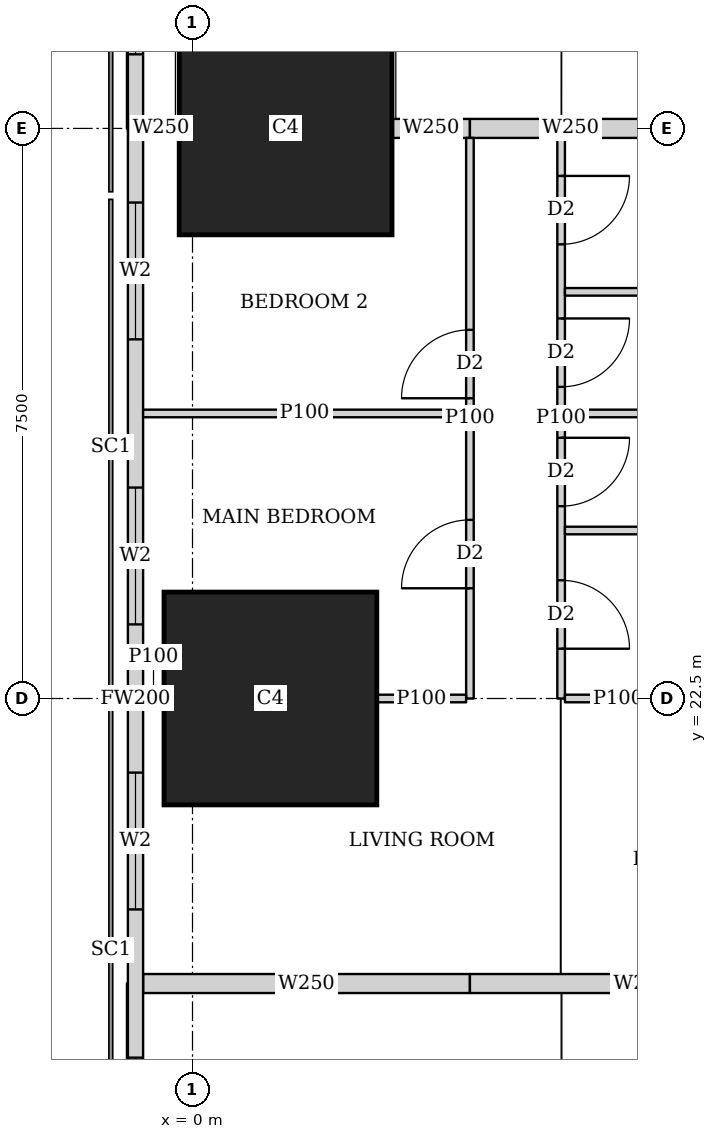
"""IFC4 building model, lengths in metres.
Left out: names, types, materials, properties, quantities, classifications, styles, units other than length and angle.
Written with IfcOpenShell. Run it as: python <this file> out.ifc"""

import sys

from ifc_helpers import new_model, si_unit, direction, frame, frame_2d, origin, origin_2d, place, context, subcontext, project, spatial, rectangle, extrude, element, fill, save


model = new_model("IFC4")
c1 = context("Model", 3, precision=1e-05, world=origin(), true_north=direction((0.0, 1.0)))
c2 = subcontext(c1, "Body", "Model", "MODEL_VIEW")
j1 = project(units=[si_unit("LENGTHUNIT", "METRE"), si_unit("PLANEANGLEUNIT", "RADIAN")], contexts=[c1])
p1 = place(None, origin())
s1 = spatial("IfcSite", under=j1, at=p1, CompositionType="ELEMENT")
p2 = place(p1, origin())
s2 = spatial("IfcBuilding", under=s1, at=p2, CompositionType="ELEMENT")
p3 = place(p2, frame((0.0, 0.0, 31.25)))
s3 = spatial("IfcBuildingStorey", under=s2, at=p3, CompositionType="ELEMENT", Elevation=31.25)
for number, where, z_axis, x_axis in (
    (1, (1.025, 22.5, 0.0), (0.0, 0.0, 1.0), (1.0, 0.0, 0.0)),
    (2, (1.225, 30.0, 0.0), (0.0, 0.0, 1.0), (1.0, 0.0, 0.0)),
):
    element("IfcColumn", number, at=place(p3, frame(where, z_axis=z_axis, x_axis=x_axis)), inside=s3, PredefinedType="COLUMN", context=c2, shape_type="SweptSolid", body=[
        extrude(rectangle(XDim=2.8, YDim=2.8, at=origin_2d()), origin(), (0.0, 0.0, 1.0), 3.75),
    ])
p4 = place(p3, frame((-0.75, 42.837, 0.0), z_axis=(0.0, 0.0, 1.0), x_axis=(0.0, -1.0, 0.0)))
e3 = element("IfcWall", 3, at=p4, inside=s3, PredefinedType="SOLIDWALL", context=c2, shape_type="SweptSolid", body=[
    extrude(rectangle(XDim=40.674, YDim=0.2, at=frame_2d((20.337, 0.0))), origin(), (0.0, 0.0, 1.0), 3.5),
])
p5 = place(p4, frame((1.78, 0.0, 0.9)))
e4 = element("IfcOpeningElement", 4, at=p5, cuts=e3, PredefinedType="OPENING", context=c2, shape_type="SweptSolid", body=[
    extrude(rectangle(XDim=1.8, YDim=1.5, at=frame_2d((0.9, 0.75))), frame((0.0, 0.11, 0.0), z_axis=(0.0, -1.0, 0.0), x_axis=(1.0, 0.0, 0.0)), (0.0, 0.0, 1.0), 0.22),
])
p6 = place(p4, frame((6.312, 0.0, 0.9)))
e5 = element("IfcOpeningElement", 5, at=p6, cuts=e3, PredefinedType="OPENING", context=c2, shape_type="SweptSolid", body=[
    extrude(rectangle(XDim=1.8, YDim=1.5, at=frame_2d((0.9, 0.75))), frame((0.0, 0.11, 0.0), z_axis=(0.0, -1.0, 0.0), x_axis=(1.0, 0.0, 0.0)), (0.0, 0.0, 1.0), 0.22),
])
p7 = place(p4, frame((10.062, 0.0, 0.9)))
e6 = element("IfcOpeningElement", 6, at=p7, cuts=e3, PredefinedType="OPENING", context=c2, shape_type="SweptSolid", body=[
    extrude(rectangle(XDim=1.8, YDim=1.5, at=frame_2d((0.9, 0.75))), frame((0.0, 0.11, 0.0), z_axis=(0.0, -1.0, 0.0), x_axis=(1.0, 0.0, 0.0)), (0.0, 0.0, 1.0), 0.22),
])
p8 = place(p4, frame((13.812, 0.0, 0.9)))
e7 = element("IfcOpeningElement", 7, at=p8, cuts=e3, PredefinedType="OPENING", context=c2, shape_type="SweptSolid", body=[
    extrude(rectangle(XDim=1.8, YDim=1.5, at=frame_2d((0.9, 0.75))), frame((0.0, 0.11, 0.0), z_axis=(0.0, -1.0, 0.0), x_axis=(1.0, 0.0, 0.0)), (0.0, 0.0, 1.0), 0.22),
])
p9 = place(p4, frame((17.562, 0.0, 0.9)))
e8 = element("IfcOpeningElement", 8, at=p9, cuts=e3, PredefinedType="OPENING", context=c2, shape_type="SweptSolid", body=[
    extrude(rectangle(XDim=1.8, YDim=1.5, at=frame_2d((0.9, 0.75))), frame((0.0, 0.11, 0.0), z_axis=(0.0, -1.0, 0.0), x_axis=(1.0, 0.0, 0.0)), (0.0, 0.0, 1.0), 0.22),
])
p10 = place(p4, frame((21.312, 0.0, 0.9)))
e9 = element("IfcOpeningElement", 9, at=p10, cuts=e3, PredefinedType="OPENING", context=c2, shape_type="SweptSolid", body=[
    extrude(rectangle(XDim=1.8, YDim=1.5, at=frame_2d((0.9, 0.75))), frame((0.0, 0.11, 0.0), z_axis=(0.0, -1.0, 0.0), x_axis=(1.0, 0.0, 0.0)), (0.0, 0.0, 1.0), 0.22),
])
p11 = place(p4, frame((25.062, 0.0, 0.9)))
e10 = element("IfcOpeningElement", 10, at=p11, cuts=e3, PredefinedType="OPENING", context=c2, shape_type="SweptSolid", body=[
    extrude(rectangle(XDim=1.8, YDim=1.5, at=frame_2d((0.9, 0.75))), frame((0.0, 0.11, 0.0), z_axis=(0.0, -1.0, 0.0), x_axis=(1.0, 0.0, 0.0)), (0.0, 0.0, 1.0), 0.22),
])
p12 = place(p4, frame((28.812, 0.0, 0.9)))
e11 = element("IfcOpeningElement", 11, at=p12, cuts=e3, PredefinedType="OPENING", context=c2, shape_type="SweptSolid", body=[
    extrude(rectangle(XDim=1.8, YDim=1.5, at=frame_2d((0.9, 0.75))), frame((0.0, 0.11, 0.0), z_axis=(0.0, -1.0, 0.0), x_axis=(1.0, 0.0, 0.0)), (0.0, 0.0, 1.0), 0.22),
])
p13 = place(p4, frame((32.562, 0.0, 0.9)))
e12 = element("IfcOpeningElement", 12, at=p13, cuts=e3, PredefinedType="OPENING", context=c2, shape_type="SweptSolid", body=[
    extrude(rectangle(XDim=1.8, YDim=1.5, at=frame_2d((0.9, 0.75))), frame((0.0, 0.11, 0.0), z_axis=(0.0, -1.0, 0.0), x_axis=(1.0, 0.0, 0.0)), (0.0, 0.0, 1.0), 0.22),
])
p14 = place(p4, frame((37.094, 0.0, 0.9)))
e13 = element("IfcOpeningElement", 13, at=p14, cuts=e3, PredefinedType="OPENING", context=c2, shape_type="SweptSolid", body=[
    extrude(rectangle(XDim=1.8, YDim=1.5, at=frame_2d((0.9, 0.75))), frame((0.0, 0.11, 0.0), z_axis=(0.0, -1.0, 0.0), x_axis=(1.0, 0.0, 0.0)), (0.0, 0.0, 1.0), 0.22),
])
p15 = place(p3, frame((3.65, 22.5, 0.0), z_axis=(0.0, 0.0, 1.0), x_axis=(0.0, 1.0, 0.0)))
e14 = element("IfcWall", 14, at=p15, inside=s3, PredefinedType="PARTITIONING", context=c2, shape_type="SweptSolid", body=[
    extrude(rectangle(XDim=7.375, YDim=0.1, at=frame_2d((3.688, 0.0))), origin(), (0.0, 0.0, 1.0), 3.5),
])
p16 = place(p15, frame((1.45, 0.0, 0.0)))
e15 = element("IfcOpeningElement", 15, at=p16, cuts=e14, PredefinedType="OPENING", context=c2, shape_type="SweptSolid", body=[
    extrude(rectangle(XDim=0.9, YDim=2.1, at=frame_2d((0.45, 1.05))), frame((0.0, 0.06, 0.0), z_axis=(0.0, -1.0, 0.0), x_axis=(1.0, 0.0, 0.0)), (0.0, 0.0, 1.0), 0.12),
])
p17 = place(p15, frame((3.95, 0.0, 0.0)))
e16 = element("IfcOpeningElement", 16, at=p17, cuts=e14, PredefinedType="OPENING", context=c2, shape_type="SweptSolid", body=[
    extrude(rectangle(XDim=0.9, YDim=2.1, at=frame_2d((0.45, 1.05))), frame((0.0, 0.06, 0.0), z_axis=(0.0, -1.0, 0.0), x_axis=(1.0, 0.0, 0.0)), (0.0, 0.0, 1.0), 0.12),
])
p18 = place(p3, frame((4.85, 22.5, 0.0), z_axis=(0.0, 0.0, 1.0), x_axis=(0.0, 1.0, 0.0)))
e17 = element("IfcWall", 17, at=p18, inside=s3, PredefinedType="PARTITIONING", context=c2, shape_type="SweptSolid", body=[
    extrude(rectangle(XDim=7.375, YDim=0.1, at=frame_2d((3.688, 0.0))), origin(), (0.0, 0.0, 1.0), 3.5),
])
p19 = place(p18, frame((0.655, 0.0, 0.0)))
e18 = element("IfcOpeningElement", 18, at=p19, cuts=e17, PredefinedType="OPENING", context=c2, shape_type="SweptSolid", body=[
    extrude(rectangle(XDim=0.9, YDim=2.1, at=frame_2d((0.45, 1.05))), frame((0.0, 0.06, 0.0), z_axis=(0.0, -1.0, 0.0), x_axis=(1.0, 0.0, 0.0)), (0.0, 0.0, 1.0), 0.12),
])
p20 = place(p18, frame((4.1, 0.0, 0.0)))
e19 = element("IfcOpeningElement", 19, at=p20, cuts=e17, PredefinedType="OPENING", context=c2, shape_type="SweptSolid", body=[
    extrude(rectangle(XDim=0.9, YDim=2.1, at=frame_2d((0.45, 1.05))), frame((0.0, 0.06, 0.0), z_axis=(0.0, -1.0, 0.0), x_axis=(1.0, 0.0, 0.0)), (0.0, 0.0, 1.0), 0.12),
])
p21 = place(p18, frame((2.53, 0.0, 0.0)))
e20 = element("IfcOpeningElement", 20, at=p21, cuts=e17, PredefinedType="OPENING", context=c2, shape_type="SweptSolid", body=[
    extrude(rectangle(XDim=0.9, YDim=2.1, at=frame_2d((0.45, 1.05))), frame((0.0, 0.06, 0.0), z_axis=(0.0, -1.0, 0.0), x_axis=(1.0, 0.0, 0.0)), (0.0, 0.0, 1.0), 0.12),
])
p22 = place(p18, frame((5.975, 0.0, 0.0)))
e21 = element("IfcOpeningElement", 21, at=p22, cuts=e17, PredefinedType="OPENING", context=c2, shape_type="SweptSolid", body=[
    extrude(rectangle(XDim=0.9, YDim=2.1, at=frame_2d((0.45, 1.05))), frame((0.0, 0.06, 0.0), z_axis=(0.0, -1.0, 0.0), x_axis=(1.0, 0.0, 0.0)), (0.0, 0.0, 1.0), 0.12),
])
p23 = place(p3, frame((-0.65, 22.5, 0.0), z_axis=(0.0, 0.0, 1.0), x_axis=(1.0, 0.0, 0.0)))
e22 = element("IfcWall", 22, at=p23, inside=s3, PredefinedType="PARTITIONING", context=c2, shape_type="SweptSolid", body=[
    extrude(rectangle(XDim=0.274, YDim=0.1, at=frame_2d((0.137, 0.0))), origin(), (0.0, 0.0, 1.0), 3.5),
])
p24 = place(p3, frame((2.426, 22.5, 0.0), z_axis=(0.0, 0.0, 1.0), x_axis=(1.0, 0.0, 0.0)))
e23 = element("IfcWall", 23, at=p24, inside=s3, PredefinedType="PARTITIONING", context=c2, shape_type="SweptSolid", body=[
    extrude(rectangle(XDim=1.174, YDim=0.1, at=frame_2d((0.587, 0.0))), origin(), (0.0, 0.0, 1.0), 3.5),
])
p25 = place(p3, frame((-0.65, 26.25, 0.0), z_axis=(0.0, 0.0, 1.0), x_axis=(1.0, 0.0, 0.0)))
e24 = element("IfcWall", 24, at=p25, inside=s3, PredefinedType="PARTITIONING", context=c2, shape_type="SweptSolid", body=[
    extrude(rectangle(XDim=4.25, YDim=0.1, at=frame_2d((2.125, 0.0))), origin(), (0.0, 0.0, 1.0), 2.05),
])
p26 = place(p3, frame((4.9, 22.5, 0.0), z_axis=(0.0, 0.0, 1.0), x_axis=(1.0, 0.0, 0.0)))
e25 = element("IfcWall", 25, at=p26, inside=s3, PredefinedType="PARTITIONING", context=c2, shape_type="SweptSolid", body=[
    extrude(rectangle(XDim=1.399, YDim=0.1, at=frame_2d((0.7, 0.0))), origin(), (0.0, 0.0, 1.0), 3.5),
])
for number, where, z_axis, x_axis in (
    (26, (4.9, 26.25, 0.0), (0.0, 0.0, 1.0), (1.0, 0.0, 0.0)),
    (27, (4.9, 24.71, 0.0), (0.0, 0.0, 1.0), (1.0, 0.0, 0.0)),
    (28, (4.9, 27.85, 0.0), (0.0, 0.0, 1.0), (1.0, 0.0, 0.0)),
):
    element("IfcWall", number, at=place(p3, frame(where, z_axis=z_axis, x_axis=x_axis)), inside=s3, PredefinedType="PARTITIONING", context=c2, shape_type="SweptSolid", body=[
        extrude(rectangle(XDim=3.275, YDim=0.1, at=frame_2d((1.638, 0.0))), origin(), (0.0, 0.0, 1.0), 3.5),
    ])
p27 = place(p3, frame((-0.65, 18.75, 0.0), z_axis=(0.0, 0.0, 1.0), x_axis=(1.0, 0.0, 0.0)))
e29 = element("IfcWall", 29, at=p27, inside=s3, PredefinedType="SOLIDWALL", context=c2, shape_type="SweptSolid", body=[
    extrude(rectangle(XDim=4.3, YDim=0.25, at=frame_2d((2.15, 0.0))), origin(), (0.0, 0.0, 1.0), 2.05),
])
p28 = place(p3, frame((3.65, 18.75, 0.0), z_axis=(0.0, 0.0, 1.0), x_axis=(1.0, 0.0, 0.0)))
e30 = element("IfcWall", 30, at=p28, inside=s3, PredefinedType="SOLIDWALL", context=c2, shape_type="SweptSolid", body=[
    extrude(rectangle(XDim=4.525, YDim=0.25, at=frame_2d((2.263, 0.0))), origin(), (0.0, 0.0, 1.0), 3.5),
])
p29 = place(p3, frame((-0.65, 30.0, 0.0), z_axis=(0.0, 0.0, 1.0), x_axis=(1.0, 0.0, 0.0)))
e31 = element("IfcWall", 31, at=p29, inside=s3, PredefinedType="SOLIDWALL", context=c2, shape_type="SweptSolid", body=[
    extrude(rectangle(XDim=0.474, YDim=0.25, at=frame_2d((0.237, 0.0))), origin(), (0.0, 0.0, 1.0), 3.5),
])
p30 = place(p3, frame((2.626, 30.0, 0.0), z_axis=(0.0, 0.0, 1.0), x_axis=(1.0, 0.0, 0.0)))
e32 = element("IfcWall", 32, at=p30, inside=s3, PredefinedType="SOLIDWALL", context=c2, shape_type="SweptSolid", body=[
    extrude(rectangle(XDim=1.024, YDim=0.25, at=frame_2d((0.512, 0.0))), origin(), (0.0, 0.0, 1.0), 3.5),
])
p31 = place(p3, frame((3.65, 30.0, 0.0), z_axis=(0.0, 0.0, 1.0), x_axis=(1.0, 0.0, 0.0)))
e33 = element("IfcWall", 33, at=p31, inside=s3, PredefinedType="SOLIDWALL", context=c2, shape_type="SweptSolid", body=[
    extrude(rectangle(XDim=2.649, YDim=0.25, at=frame_2d((1.325, 0.0))), origin(), (0.0, 0.0, 1.0), 3.5),
])
p32 = place(p7, origin())
e34 = element("IfcWindow", 34, at=p32, inside=s3, PartitioningType="SINGLE_PANEL", PredefinedType="WINDOW", context=c2, shape_type="SweptSolid", body=[
    extrude(rectangle(XDim=1.8, YDim=1.5, at=frame_2d((0.9, 0.75))), frame((0.0, 0.03, 0.0), z_axis=(0.0, -1.0, 0.0), x_axis=(1.0, 0.0, 0.0)), (0.0, 0.0, 1.0), 0.06),
])
fill(e6, e34)
p33 = place(p8, origin())
e35 = element("IfcWindow", 35, at=p33, inside=s3, PartitioningType="SINGLE_PANEL", PredefinedType="WINDOW", context=c2, shape_type="SweptSolid", body=[
    extrude(rectangle(XDim=1.8, YDim=1.5, at=frame_2d((0.9, 0.75))), frame((0.0, 0.03, 0.0), z_axis=(0.0, -1.0, 0.0), x_axis=(1.0, 0.0, 0.0)), (0.0, 0.0, 1.0), 0.06),
])
fill(e7, e35)
p34 = place(p9, origin())
e36 = element("IfcWindow", 36, at=p34, inside=s3, PartitioningType="SINGLE_PANEL", PredefinedType="WINDOW", context=c2, shape_type="SweptSolid", body=[
    extrude(rectangle(XDim=1.8, YDim=1.5, at=frame_2d((0.9, 0.75))), frame((0.0, 0.03, 0.0), z_axis=(0.0, -1.0, 0.0), x_axis=(1.0, 0.0, 0.0)), (0.0, 0.0, 1.0), 0.06),
])
fill(e8, e36)
p35 = place(p10, origin())
e37 = element("IfcWindow", 37, at=p35, inside=s3, PartitioningType="SINGLE_PANEL", PredefinedType="WINDOW", context=c2, shape_type="SweptSolid", body=[
    extrude(rectangle(XDim=1.8, YDim=1.5, at=frame_2d((0.9, 0.75))), frame((0.0, 0.03, 0.0), z_axis=(0.0, -1.0, 0.0), x_axis=(1.0, 0.0, 0.0)), (0.0, 0.0, 1.0), 0.06),
])
fill(e9, e37)
p36 = place(p11, origin())
e38 = element("IfcWindow", 38, at=p36, inside=s3, PartitioningType="SINGLE_PANEL", PredefinedType="WINDOW", context=c2, shape_type="SweptSolid", body=[
    extrude(rectangle(XDim=1.8, YDim=1.5, at=frame_2d((0.9, 0.75))), frame((0.0, 0.03, 0.0), z_axis=(0.0, -1.0, 0.0), x_axis=(1.0, 0.0, 0.0)), (0.0, 0.0, 1.0), 0.06),
])
fill(e10, e38)
p37 = place(p16, origin())
e39 = element("IfcDoor", 39, at=p37, inside=s3, OperationType="SINGLE_SWING_LEFT", PredefinedType="DOOR", context=c2, shape_type="SweptSolid", body=[
    extrude(rectangle(XDim=0.9, YDim=2.1, at=frame_2d((0.45, 1.05))), frame((0.0, 0.025, 0.0), z_axis=(0.0, -1.0, 0.0), x_axis=(1.0, 0.0, 0.0)), (0.0, 0.0, 1.0), 0.05),
])
fill(e15, e39)
p38 = place(p17, origin())
e40 = element("IfcDoor", 40, at=p38, inside=s3, OperationType="SINGLE_SWING_LEFT", PredefinedType="DOOR", context=c2, shape_type="SweptSolid", body=[
    extrude(rectangle(XDim=0.9, YDim=2.1, at=frame_2d((0.45, 1.05))), frame((0.0, 0.025, 0.0), z_axis=(0.0, -1.0, 0.0), x_axis=(1.0, 0.0, 0.0)), (0.0, 0.0, 1.0), 0.05),
])
fill(e16, e40)
p39 = place(p19, origin())
e41 = element("IfcDoor", 41, at=p39, inside=s3, OperationType="SINGLE_SWING_RIGHT", PredefinedType="DOOR", context=c2, shape_type="SweptSolid", body=[
    extrude(rectangle(XDim=0.9, YDim=2.1, at=frame_2d((0.45, 1.05))), frame((0.0, 0.025, 0.0), z_axis=(0.0, -1.0, 0.0), x_axis=(1.0, 0.0, 0.0)), (0.0, 0.0, 1.0), 0.05),
])
fill(e18, e41)
p40 = place(p20, origin())
e42 = element("IfcDoor", 42, at=p40, inside=s3, OperationType="SINGLE_SWING_LEFT", PredefinedType="DOOR", context=c2, shape_type="SweptSolid", body=[
    extrude(rectangle(XDim=0.9, YDim=2.1, at=frame_2d((0.45, 1.05))), frame((0.0, 0.025, 0.0), z_axis=(0.0, -1.0, 0.0), x_axis=(1.0, 0.0, 0.0)), (0.0, 0.0, 1.0), 0.05),
])
fill(e19, e42)
p41 = place(p21, origin())
e43 = element("IfcDoor", 43, at=p41, inside=s3, OperationType="SINGLE_SWING_LEFT", PredefinedType="DOOR", context=c2, shape_type="SweptSolid", body=[
    extrude(rectangle(XDim=0.9, YDim=2.1, at=frame_2d((0.45, 1.05))), frame((0.0, 0.025, 0.0), z_axis=(0.0, -1.0, 0.0), x_axis=(1.0, 0.0, 0.0)), (0.0, 0.0, 1.0), 0.05),
])
fill(e20, e43)
p42 = place(p22, origin())
e44 = element("IfcDoor", 44, at=p42, inside=s3, OperationType="SINGLE_SWING_LEFT", PredefinedType="DOOR", context=c2, shape_type="SweptSolid", body=[
    extrude(rectangle(XDim=0.9, YDim=2.1, at=frame_2d((0.45, 1.05))), frame((0.0, 0.025, 0.0), z_axis=(0.0, -1.0, 0.0), x_axis=(1.0, 0.0, 0.0)), (0.0, 0.0, 1.0), 0.05),
])
fill(e21, e44)
save(model, sys.argv[1])
